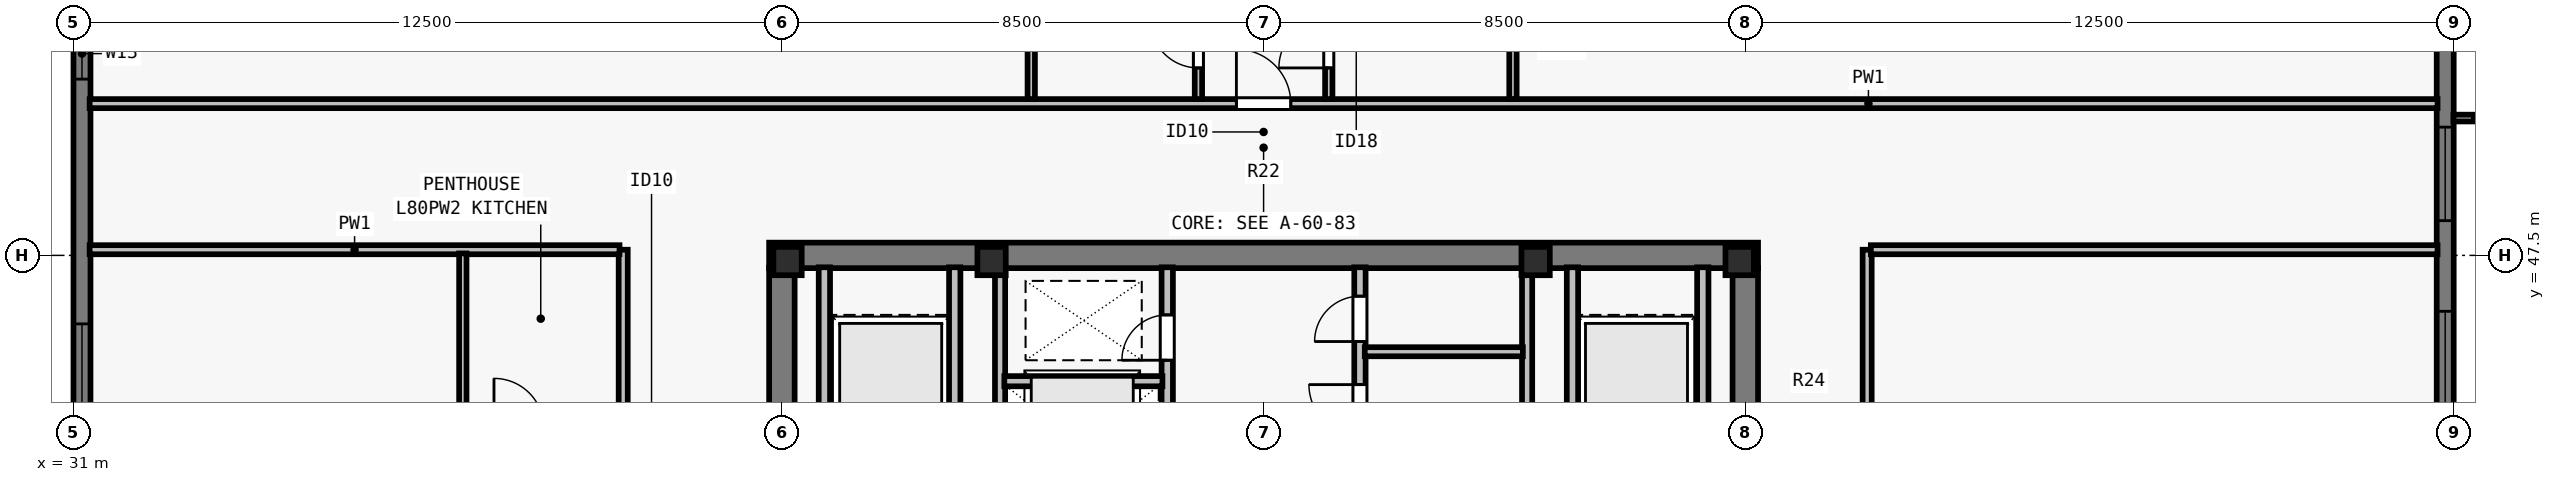
"""IFC4 building model, lengths in metres.
Left out: names, types, materials, properties, quantities, classifications, styles, units other than length and angle.
Written with IfcOpenShell. Run it as: python <this file> out.ifc"""

import sys

from ifc_helpers import new_model, si_unit, direction, frame, frame_2d, origin, origin_2d, place, context, subcontext, project, spatial, rectangle, i_section, extrude, element, fill, save


model = new_model("IFC4")
c1 = context("Model", 3, precision=1e-05, world=origin(), true_north=direction((0.0, 1.0)))
c2 = subcontext(c1, "Body", "Model", "MODEL_VIEW")
j1 = project(units=[si_unit("LENGTHUNIT", "METRE"), si_unit("PLANEANGLEUNIT", "RADIAN")], contexts=[c1])
p1 = place(None, origin())
s1 = spatial("IfcSite", under=j1, at=p1, CompositionType="ELEMENT")
p2 = place(p1, origin())
s2 = spatial("IfcBuilding", under=s1, at=p2, CompositionType="ELEMENT")
p3 = place(p2, frame((0.0, 0.0, 291.0)))
s3 = spatial("IfcBuildingStorey", under=s2, at=p3, CompositionType="ELEMENT", Elevation=291.0)
for number, where, z_axis, x_axis in (
    (1, (43.6, 47.4, 0.0), (0.0, 0.0, 1.0), (1.0, 0.0, 0.0)),
    (2, (47.2, 47.4, 0.0), (0.0, 0.0, 1.0), (1.0, 0.0, 0.0)),
    (3, (56.8, 47.4, 0.0), (0.0, 0.0, 1.0), (1.0, 0.0, 0.0)),
    (4, (60.4, 47.4, 0.0), (0.0, 0.0, 1.0), (1.0, 0.0, 0.0)),
):
    element("IfcColumn", number, at=place(p3, frame(where, z_axis=z_axis, x_axis=x_axis)), inside=s3, PredefinedType="COLUMN", context=c2, shape_type="SweptSolid", body=[
        extrude(i_section(OverallWidth=0.5, OverallDepth=0.5, WebThickness=0.028, FlangeThickness=0.045, at=origin_2d()), origin(), (0.0, 0.0, 1.0), 3.5),
    ])
p4 = place(p3, frame((31.15, 23.5, 0.0), z_axis=(0.0, 0.0, 1.0), x_axis=(0.0, 1.0, 0.0)))
e5 = element("IfcWall", 5, at=p4, inside=s3, PredefinedType="SOLIDWALL", context=c2, shape_type="SweptSolid", body=[
    extrude(rectangle(XDim=30.722, YDim=0.3, at=frame_2d((15.361, 0.0))), origin(), (0.0, 0.0, 1.0), 3.29),
])
p5 = place(p4, frame((4.944, 0.0, 0.8)))
e6 = element("IfcOpeningElement", 6, at=p5, cuts=e5, PredefinedType="OPENING", context=c2, shape_type="SweptSolid", body=[
    extrude(rectangle(XDim=1.65, YDim=1.758, at=frame_2d((0.825, 0.879))), frame((0.0, 0.16, 0.0), z_axis=(0.0, -1.0, 0.0), x_axis=(1.0, 0.0, 0.0)), (0.0, 0.0, 1.0), 0.32),
])
p6 = place(p4, frame((7.355, 0.0, 0.8)))
e7 = element("IfcOpeningElement", 7, at=p6, cuts=e5, PredefinedType="OPENING", context=c2, shape_type="SweptSolid", body=[
    extrude(rectangle(XDim=2.0, YDim=1.758, at=frame_2d((1.0, 0.879))), frame((0.0, 0.16, 0.0), z_axis=(0.0, -1.0, 0.0), x_axis=(1.0, 0.0, 0.0)), (0.0, 0.0, 1.0), 0.32),
])
p7 = place(p4, frame((12.617, 0.0, 0.8)))
e8 = element("IfcOpeningElement", 8, at=p7, cuts=e5, PredefinedType="OPENING", context=c2, shape_type="SweptSolid", body=[
    extrude(rectangle(XDim=1.65, YDim=1.758, at=frame_2d((0.825, 0.879))), frame((0.0, 0.16, 0.0), z_axis=(0.0, -1.0, 0.0), x_axis=(1.0, 0.0, 0.0)), (0.0, 0.0, 1.0), 0.32),
])
p8 = place(p4, frame((16.28, 0.0, 0.8)))
e9 = element("IfcOpeningElement", 9, at=p8, cuts=e5, PredefinedType="OPENING", context=c2, shape_type="SweptSolid", body=[
    extrude(rectangle(XDim=2.0, YDim=1.758, at=frame_2d((1.0, 0.879))), frame((0.0, 0.16, 0.0), z_axis=(0.0, -1.0, 0.0), x_axis=(1.0, 0.0, 0.0)), (0.0, 0.0, 1.0), 0.32),
])
p9 = place(p4, frame((21.142, 0.0, 0.8)))
e10 = element("IfcOpeningElement", 10, at=p9, cuts=e5, PredefinedType="OPENING", context=c2, shape_type="SweptSolid", body=[
    extrude(rectangle(XDim=1.65, YDim=1.758, at=frame_2d((0.825, 0.879))), frame((0.0, 0.16, 0.0), z_axis=(0.0, -1.0, 0.0), x_axis=(1.0, 0.0, 0.0)), (0.0, 0.0, 1.0), 0.32),
])
p10 = place(p4, frame((27.11, 0.0, 0.8)))
e11 = element("IfcOpeningElement", 11, at=p10, cuts=e5, PredefinedType="OPENING", context=c2, shape_type="SweptSolid", body=[
    extrude(rectangle(XDim=0.9, YDim=1.75, at=frame_2d((0.45, 0.875))), frame((0.0, 0.16, 0.0), z_axis=(0.0, -1.0, 0.0), x_axis=(1.0, 0.0, 0.0)), (0.0, 0.0, 1.0), 0.32),
])
p11 = place(p3, frame((72.85, 54.5, 0.0), z_axis=(0.0, 0.0, 1.0), x_axis=(0.0, -1.0, 0.0)))
e12 = element("IfcWall", 12, at=p11, inside=s3, PredefinedType="SOLIDWALL", context=c2, shape_type="SweptSolid", body=[
    extrude(rectangle(XDim=22.222, YDim=0.3, at=frame_2d((11.111, 0.0))), origin(), (0.0, 0.0, 1.0), 3.29),
])
p12 = place(p11, frame((4.737, 0.0, 0.8)))
e13 = element("IfcOpeningElement", 13, at=p12, cuts=e12, PredefinedType="OPENING", context=c2, shape_type="SweptSolid", body=[
    extrude(rectangle(XDim=1.65, YDim=1.758, at=frame_2d((0.825, 0.879))), frame((0.0, 0.16, 0.0), z_axis=(0.0, -1.0, 0.0), x_axis=(1.0, 0.0, 0.0)), (0.0, 0.0, 1.0), 0.32),
])
p13 = place(p11, frame((7.987, 0.0, 0.8)))
e14 = element("IfcOpeningElement", 14, at=p13, cuts=e12, PredefinedType="OPENING", context=c2, shape_type="SweptSolid", body=[
    extrude(rectangle(XDim=2.0, YDim=1.758, at=frame_2d((1.0, 0.879))), frame((0.0, 0.16, 0.0), z_axis=(0.0, -1.0, 0.0), x_axis=(1.0, 0.0, 0.0)), (0.0, 0.0, 1.0), 0.32),
])
p14 = place(p11, frame((11.586, 0.0, 0.8)))
e15 = element("IfcOpeningElement", 15, at=p14, cuts=e12, PredefinedType="OPENING", context=c2, shape_type="SweptSolid", body=[
    extrude(rectangle(XDim=1.65, YDim=1.758, at=frame_2d((0.825, 0.879))), frame((0.0, 0.16, 0.0), z_axis=(0.0, -1.0, 0.0), x_axis=(1.0, 0.0, 0.0)), (0.0, 0.0, 1.0), 0.32),
])
p15 = place(p11, frame((14.835, 0.0, 0.8)))
e16 = element("IfcOpeningElement", 16, at=p15, cuts=e12, PredefinedType="OPENING", context=c2, shape_type="SweptSolid", body=[
    extrude(rectangle(XDim=2.0, YDim=1.758, at=frame_2d((1.0, 0.879))), frame((0.0, 0.16, 0.0), z_axis=(0.0, -1.0, 0.0), x_axis=(1.0, 0.0, 0.0)), (0.0, 0.0, 1.0), 0.32),
])
p16 = place(p11, frame((17.985, 0.0, 0.8)))
e17 = element("IfcOpeningElement", 17, at=p16, cuts=e12, PredefinedType="OPENING", context=c2, shape_type="SweptSolid", body=[
    extrude(rectangle(XDim=1.65, YDim=1.758, at=frame_2d((0.825, 0.879))), frame((0.0, 0.16, 0.0), z_axis=(0.0, -1.0, 0.0), x_axis=(1.0, 0.0, 0.0)), (0.0, 0.0, 1.0), 0.32),
])
p17 = place(p3, frame((43.275, 47.5, 0.0), z_axis=(0.0, 0.0, 1.0), x_axis=(1.0, 0.0, 0.0)))
e18 = element("IfcWall", 18, at=p17, inside=s3, PredefinedType="SHEAR", context=c2, shape_type="SweptSolid", body=[
    extrude(rectangle(XDim=17.45, YDim=0.45, at=frame_2d((8.725, 0.0))), origin(), (0.0, 0.0, 1.0), 3.29),
])
for number, where, z_axis, x_axis in (
    (19, (43.5, 40.8, 0.0), (0.0, 0.0, 1.0), (0.0, 1.0, 0.0)),
    (20, (60.5, 40.8, 0.0), (0.0, 0.0, 1.0), (0.0, 1.0, 0.0)),
):
    element("IfcWall", number, at=place(p3, frame(where, z_axis=z_axis, x_axis=x_axis)), inside=s3, PredefinedType="SHEAR", context=c2, shape_type="SweptSolid", body=[
        extrude(rectangle(XDim=6.485, YDim=0.45, at=frame_2d((3.242, 0.0))), origin(), (0.0, 0.0, 1.0), 3.29),
    ])
p18 = place(p3, frame((50.3, 40.585, 0.0), z_axis=(0.0, 0.0, 1.0), x_axis=(0.0, 1.0, 0.0)))
e21 = element("IfcWall", 21, at=p18, inside=s3, PredefinedType="SOLIDWALL", context=c2, shape_type="SweptSolid", body=[
    extrude(rectangle(XDim=6.705, YDim=0.2, at=frame_2d((3.353, 0.0))), origin(), (0.0, 0.0, 1.0), 3.29),
])
p19 = place(p18, frame((0.515, 0.0, 0.0)))
e22 = element("IfcOpeningElement", 22, at=p19, cuts=e21, PredefinedType="OPENING", context=c2, shape_type="SweptSolid", body=[
    extrude(rectangle(XDim=1.1, YDim=2.2, at=frame_2d((0.55, 1.1))), frame((0.0, 0.11, 0.0), z_axis=(0.0, -1.0, 0.0), x_axis=(1.0, 0.0, 0.0)), (0.0, 0.0, 1.0), 0.22),
])
p20 = place(p18, frame((3.015, 0.0, 0.0)))
e23 = element("IfcOpeningElement", 23, at=p20, cuts=e21, PredefinedType="OPENING", context=c2, shape_type="SweptSolid", body=[
    extrude(rectangle(XDim=1.1, YDim=2.2, at=frame_2d((0.55, 1.1))), frame((0.0, 0.11, 0.0), z_axis=(0.0, -1.0, 0.0), x_axis=(1.0, 0.0, 0.0)), (0.0, 0.0, 1.0), 0.22),
])
p21 = place(p18, frame((5.065, 0.0, 0.0)))
e24 = element("IfcOpeningElement", 24, at=p21, cuts=e21, PredefinedType="OPENING", context=c2, shape_type="SweptSolid", body=[
    extrude(rectangle(XDim=0.8, YDim=2.08, at=frame_2d((0.4, 1.04))), frame((0.0, 0.11, 0.0), z_axis=(0.0, -1.0, 0.0), x_axis=(1.0, 0.0, 0.0)), (0.0, 0.0, 1.0), 0.22),
])
p22 = place(p3, frame((53.7, 40.585, 0.0), z_axis=(0.0, 0.0, 1.0), x_axis=(0.0, 1.0, 0.0)))
e25 = element("IfcWall", 25, at=p22, inside=s3, PredefinedType="SOLIDWALL", context=c2, shape_type="SweptSolid", body=[
    extrude(rectangle(XDim=6.705, YDim=0.2, at=frame_2d((3.353, 0.0))), origin(), (0.0, 0.0, 1.0), 3.29),
])
p23 = place(p22, frame((0.195, 0.0, 0.0)))
e26 = element("IfcOpeningElement", 26, at=p23, cuts=e25, PredefinedType="OPENING", context=c2, shape_type="SweptSolid", body=[
    extrude(rectangle(XDim=0.8, YDim=2.08, at=frame_2d((0.4, 1.04))), frame((0.0, 0.11, 0.0), z_axis=(0.0, -1.0, 0.0), x_axis=(1.0, 0.0, 0.0)), (0.0, 0.0, 1.0), 0.22),
])
p24 = place(p22, frame((1.865, 0.0, 0.0)))
e27 = element("IfcOpeningElement", 27, at=p24, cuts=e25, PredefinedType="OPENING", context=c2, shape_type="SweptSolid", body=[
    extrude(rectangle(XDim=1.1, YDim=2.2, at=frame_2d((0.55, 1.1))), frame((0.0, 0.11, 0.0), z_axis=(0.0, -1.0, 0.0), x_axis=(1.0, 0.0, 0.0)), (0.0, 0.0, 1.0), 0.22),
])
p25 = place(p22, frame((3.735, 0.0, 0.0)))
e28 = element("IfcOpeningElement", 28, at=p25, cuts=e25, PredefinedType="OPENING", context=c2, shape_type="SweptSolid", body=[
    extrude(rectangle(XDim=0.9, YDim=2.12, at=frame_2d((0.45, 1.06))), frame((0.0, 0.11, 0.0), z_axis=(0.0, -1.0, 0.0), x_axis=(1.0, 0.0, 0.0)), (0.0, 0.0, 1.0), 0.22),
])
p26 = place(p22, frame((5.395, 0.0, 0.0)))
e29 = element("IfcOpeningElement", 29, at=p26, cuts=e25, PredefinedType="OPENING", context=c2, shape_type="SweptSolid", body=[
    extrude(rectangle(XDim=0.8, YDim=2.1, at=frame_2d((0.4, 1.05))), frame((0.0, 0.11, 0.0), z_axis=(0.0, -1.0, 0.0), x_axis=(1.0, 0.0, 0.0)), (0.0, 0.0, 1.0), 0.22),
])
for number, where, z_axis, x_axis in (
    (30, (46.55, 43.735, 0.0), (0.0, 0.0, 1.0), (0.0, 1.0, 0.0)),
    (31, (44.25, 43.735, 0.0), (0.0, 0.0, 1.0), (0.0, 1.0, 0.0)),
    (32, (57.45, 43.735, 0.0), (0.0, 0.0, 1.0), (0.0, 1.0, 0.0)),
    (33, (59.75, 43.735, 0.0), (0.0, 0.0, 1.0), (0.0, 1.0, 0.0)),
):
    element("IfcWall", number, at=place(p3, frame(where, z_axis=z_axis, x_axis=x_axis)), inside=s3, PredefinedType="SOLIDWALL", context=c2, shape_type="SweptSolid", body=[
        extrude(rectangle(XDim=3.555, YDim=0.2, at=frame_2d((1.777, 0.0))), origin(), (0.0, 0.0, 1.0), 3.29),
    ])
p27 = place(p3, frame((47.35, 43.735, 0.0), z_axis=(0.0, 0.0, 1.0), x_axis=(0.0, 1.0, 0.0)))
e34 = element("IfcWall", 34, at=p27, inside=s3, PredefinedType="SOLIDWALL", context=c2, shape_type="SweptSolid", body=[
    extrude(rectangle(XDim=3.555, YDim=0.18, at=frame_2d((1.777, 0.0))), origin(), (0.0, 0.0, 1.0), 3.29),
])
p28 = place(p3, frame((47.425, 45.28, 0.0), z_axis=(0.0, 0.0, 1.0), x_axis=(1.0, 0.0, 0.0)))
e35 = element("IfcWall", 35, at=p28, inside=s3, PredefinedType="SOLIDWALL", context=c2, shape_type="SweptSolid", body=[
    extrude(rectangle(XDim=2.79, YDim=0.18, at=frame_2d((1.395, 0.0))), origin(), (0.0, 0.0, 1.0), 3.29),
])
p29 = place(p3, frame((56.65, 43.735, 0.0), z_axis=(0.0, 0.0, 1.0), x_axis=(0.0, 1.0, 0.0)))
e36 = element("IfcWall", 36, at=p29, inside=s3, PredefinedType="SOLIDWALL", context=c2, shape_type="SweptSolid", body=[
    extrude(rectangle(XDim=3.555, YDim=0.18, at=frame_2d((1.777, 0.0))), origin(), (0.0, 0.0, 1.0), 3.29),
])
p30 = place(p3, frame((53.785, 45.8, 0.0), z_axis=(0.0, 0.0, 1.0), x_axis=(1.0, 0.0, 0.0)))
e37 = element("IfcWall", 37, at=p30, inside=s3, PredefinedType="PARTITIONING", context=c2, shape_type="SweptSolid", body=[
    extrude(rectangle(XDim=2.79, YDim=0.16, at=frame_2d((1.395, 0.0))), origin(), (0.0, 0.0, 1.0), 3.29),
])
p31 = place(p3, frame((31.285, 50.177, 0.0), z_axis=(0.0, 0.0, 1.0), x_axis=(1.0, 0.0, 0.0)))
e38 = element("IfcWall", 38, at=p31, inside=s3, PredefinedType="PARTITIONING", context=c2, shape_type="SweptSolid", body=[
    extrude(rectangle(XDim=41.43, YDim=0.16, at=frame_2d((20.715, 0.0))), origin(), (0.0, 0.0, 1.0), 3.009),
])
p32 = place(p31, frame((20.235, 0.0, 0.0)))
e39 = element("IfcOpeningElement", 39, at=p32, cuts=e38, PredefinedType="OPENING", context=c2, shape_type="SweptSolid", body=[
    extrude(rectangle(XDim=0.96, YDim=2.18, at=frame_2d((0.48, 1.09))), frame((0.0, 0.09, 0.0), z_axis=(0.0, -1.0, 0.0), x_axis=(1.0, 0.0, 0.0)), (0.0, 0.0, 1.0), 0.18),
])
p33 = place(p3, frame((40.7, 30.4, 0.0), z_axis=(0.0, 0.0, 1.0), x_axis=(0.0, 1.0, 0.0)))
e40 = element("IfcWall", 40, at=p33, inside=s3, PredefinedType="PARTITIONING", context=c2, shape_type="SweptSolid", body=[
    extrude(rectangle(XDim=17.2, YDim=0.16, at=frame_2d((8.6, 0.0))), origin(), (0.0, 0.0, 1.0), 3.009),
])
p34 = place(p33, frame((3.82, 0.0, 0.0)))
e41 = element("IfcOpeningElement", 41, at=p34, cuts=e40, PredefinedType="OPENING", context=c2, shape_type="SweptSolid", body=[
    extrude(rectangle(XDim=0.96, YDim=2.18, at=frame_2d((0.48, 1.09))), frame((0.0, 0.09, 0.0), z_axis=(0.0, -1.0, 0.0), x_axis=(1.0, 0.0, 0.0)), (0.0, 0.0, 1.0), 0.18),
])
p35 = place(p33, frame((12.42, 0.0, 0.0)))
e42 = element("IfcOpeningElement", 42, at=p35, cuts=e40, PredefinedType="OPENING", context=c2, shape_type="SweptSolid", body=[
    extrude(rectangle(XDim=0.96, YDim=2.18, at=frame_2d((0.48, 1.09))), frame((0.0, 0.09, 0.0), z_axis=(0.0, -1.0, 0.0), x_axis=(1.0, 0.0, 0.0)), (0.0, 0.0, 1.0), 0.18),
])
p36 = place(p3, frame((62.65, 30.4, 0.0), z_axis=(0.0, 0.0, 1.0), x_axis=(0.0, 1.0, 0.0)))
e43 = element("IfcWall", 43, at=p36, inside=s3, PredefinedType="PARTITIONING", context=c2, shape_type="SweptSolid", body=[
    extrude(rectangle(XDim=17.2, YDim=0.16, at=frame_2d((8.6, 0.0))), origin(), (0.0, 0.0, 1.0), 3.29),
])
p37 = place(p36, frame((8.0, 0.0, 0.0)))
e44 = element("IfcOpeningElement", 44, at=p37, cuts=e43, PredefinedType="OPENING", context=c2, shape_type="SweptSolid", body=[
    extrude(rectangle(XDim=0.96, YDim=2.12, at=frame_2d((0.48, 1.06))), frame((0.0, 0.09, 0.0), z_axis=(0.0, -1.0, 0.0), x_axis=(1.0, 0.0, 0.0)), (0.0, 0.0, 1.0), 0.18),
])
p38 = place(p3, frame((31.285, 47.6, 0.0), z_axis=(0.0, 0.0, 1.0), x_axis=(1.0, 0.0, 0.0)))
e45 = element("IfcWall", 45, at=p38, inside=s3, PredefinedType="PARTITIONING", context=c2, shape_type="SweptSolid", body=[
    extrude(rectangle(XDim=9.35, YDim=0.16, at=frame_2d((4.675, 0.0))), origin(), (0.0, 0.0, 1.0), 3.29),
])
p39 = place(p3, frame((62.715, 47.6, 0.0), z_axis=(0.0, 0.0, 1.0), x_axis=(1.0, 0.0, 0.0)))
e46 = element("IfcWall", 46, at=p39, inside=s3, PredefinedType="PARTITIONING", context=c2, shape_type="SweptSolid", body=[
    extrude(rectangle(XDim=10.0, YDim=0.16, at=frame_2d((5.0, 0.0))), origin(), (0.0, 0.0, 1.0), 3.29),
])
p40 = place(p3, frame((47.9, 50.258, 0.0), z_axis=(0.0, 0.0, 1.0), x_axis=(0.0, 1.0, 0.0)))
e47 = element("IfcWall", 47, at=p40, inside=s3, PredefinedType="PLUMBINGWALL", context=c2, shape_type="SweptSolid", body=[
    extrude(rectangle(XDim=2.75, YDim=0.13, at=frame_2d((1.375, 0.0))), origin(), (0.0, 0.0, 1.0), 3.29),
])
p41 = place(p3, frame((50.85, 50.258, 0.0), z_axis=(0.0, 0.0, 1.0), x_axis=(0.0, 1.0, 0.0)))
e48 = element("IfcWall", 48, at=p41, inside=s3, PredefinedType="PLUMBINGWALL", context=c2, shape_type="SweptSolid", body=[
    extrude(rectangle(XDim=2.75, YDim=0.13, at=frame_2d((1.375, 0.0))), origin(), (0.0, 0.0, 1.0), 3.009),
])
p42 = place(p41, frame((0.55, 0.0, 0.0)))
e49 = element("IfcOpeningElement", 49, at=p42, cuts=e48, PredefinedType="OPENING", context=c2, shape_type="SweptSolid", body=[
    extrude(rectangle(XDim=0.85, YDim=2.08, at=frame_2d((0.425, 1.04))), frame((0.0, 0.075, 0.0), z_axis=(0.0, -1.0, 0.0), x_axis=(1.0, 0.0, 0.0)), (0.0, 0.0, 1.0), 0.15),
])
p43 = place(p3, frame((56.4, 50.258, 0.0), z_axis=(0.0, 0.0, 1.0), x_axis=(0.0, 1.0, 0.0)))
e50 = element("IfcWall", 50, at=p43, inside=s3, PredefinedType="PLUMBINGWALL", context=c2, shape_type="SweptSolid", body=[
    extrude(rectangle(XDim=2.75, YDim=0.13, at=frame_2d((1.375, 0.0))), origin(), (0.0, 0.0, 1.0), 3.29),
])
p44 = place(p3, frame((53.15, 50.258, 0.0), z_axis=(0.0, 0.0, 1.0), x_axis=(0.0, 1.0, 0.0)))
e51 = element("IfcWall", 51, at=p44, inside=s3, PredefinedType="PLUMBINGWALL", context=c2, shape_type="SweptSolid", body=[
    extrude(rectangle(XDim=2.75, YDim=0.13, at=frame_2d((1.375, 0.0))), origin(), (0.0, 0.0, 1.0), 3.29),
])
p45 = place(p44, frame((0.55, 0.0, 0.0)))
e52 = element("IfcOpeningElement", 52, at=p45, cuts=e51, PredefinedType="OPENING", context=c2, shape_type="SweptSolid", body=[
    extrude(rectangle(XDim=0.88, YDim=2.1, at=frame_2d((0.44, 1.05))), frame((0.0, 0.075, 0.0), z_axis=(0.0, -1.0, 0.0), x_axis=(1.0, 0.0, 0.0)), (0.0, 0.0, 1.0), 0.15),
])
p46 = place(p3, frame((37.87, 44.5, 0.0), z_axis=(0.0, 0.0, 1.0), x_axis=(0.0, 1.0, 0.0)))
e53 = element("IfcWall", 53, at=p46, inside=s3, PredefinedType="PLUMBINGWALL", context=c2, shape_type="SweptSolid", body=[
    extrude(rectangle(XDim=3.035, YDim=0.13, at=frame_2d((1.518, 0.0))), origin(), (0.0, 0.0, 1.0), 3.29),
])
p47 = place(p9, origin())
e54 = element("IfcWindow", 54, at=p47, inside=s3, PartitioningType="SINGLE_PANEL", PredefinedType="WINDOW", context=c2, shape_type="SweptSolid", body=[
    extrude(rectangle(XDim=1.65, YDim=1.758, at=frame_2d((0.825, 0.879))), frame((0.0, -0.05, 0.0), z_axis=(0.0, -1.0, 0.0), x_axis=(1.0, 0.0, 0.0)), (0.0, 0.0, 1.0), 0.06),
])
fill(e10, e54)
p48 = place(p12, origin())
e55 = element("IfcWindow", 55, at=p48, inside=s3, PartitioningType="SINGLE_PANEL", PredefinedType="WINDOW", context=c2, shape_type="SweptSolid", body=[
    extrude(rectangle(XDim=1.65, YDim=1.758, at=frame_2d((0.825, 0.879))), frame((0.0, -0.05, 0.0), z_axis=(0.0, -1.0, 0.0), x_axis=(1.0, 0.0, 0.0)), (0.0, 0.0, 1.0), 0.06),
])
fill(e13, e55)
p49 = place(p13, origin())
e56 = element("IfcWindow", 56, at=p49, inside=s3, PartitioningType="SINGLE_PANEL", PredefinedType="WINDOW", context=c2, shape_type="SweptSolid", body=[
    extrude(rectangle(XDim=2.0, YDim=1.758, at=frame_2d((1.0, 0.879))), frame((0.0, -0.05, 0.0), z_axis=(0.0, -1.0, 0.0), x_axis=(1.0, 0.0, 0.0)), (0.0, 0.0, 1.0), 0.06),
])
fill(e14, e56)
p50 = place(p10, origin())
e57 = element("IfcWindow", 57, at=p50, inside=s3, PartitioningType="SINGLE_PANEL", PredefinedType="WINDOW", context=c2, shape_type="SweptSolid", body=[
    extrude(rectangle(XDim=0.9, YDim=1.75, at=frame_2d((0.45, 0.875))), frame((0.0, -0.04, 0.0), z_axis=(0.0, -1.0, 0.0), x_axis=(1.0, 0.0, 0.0)), (0.0, 0.0, 1.0), 0.06),
])
fill(e11, e57)
p51 = place(p21, origin())
e58 = element("IfcDoor", 58, at=p51, inside=s3, OperationType="SINGLE_SWING_LEFT", PredefinedType="DOOR", context=c2, shape_type="SweptSolid", body=[
    extrude(rectangle(XDim=0.8, YDim=2.08, at=frame_2d((0.4, 1.04))), frame((0.0, 0.025, 0.0), z_axis=(0.0, -1.0, 0.0), x_axis=(1.0, 0.0, 0.0)), (0.0, 0.0, 1.0), 0.05),
])
fill(e24, e58)
p52 = place(p25, origin())
e59 = element("IfcDoor", 59, at=p52, inside=s3, OperationType="SINGLE_SWING_RIGHT", PredefinedType="DOOR", context=c2, shape_type="SweptSolid", body=[
    extrude(rectangle(XDim=0.9, YDim=2.12, at=frame_2d((0.45, 1.06))), frame((0.0, 0.025, 0.0), z_axis=(0.0, -1.0, 0.0), x_axis=(1.0, 0.0, 0.0)), (0.0, 0.0, 1.0), 0.05),
])
fill(e28, e59)
p53 = place(p26, origin())
e60 = element("IfcDoor", 60, at=p53, inside=s3, OperationType="SINGLE_SWING_LEFT", PredefinedType="DOOR", context=c2, shape_type="SweptSolid", body=[
    extrude(rectangle(XDim=0.8, YDim=2.1, at=frame_2d((0.4, 1.05))), frame((0.0, 0.025, 0.0), z_axis=(0.0, -1.0, 0.0), x_axis=(1.0, 0.0, 0.0)), (0.0, 0.0, 1.0), 0.05),
])
fill(e29, e60)
p54 = place(p42, origin())
e61 = element("IfcDoor", 61, at=p54, inside=s3, OperationType="SINGLE_SWING_RIGHT", PredefinedType="DOOR", context=c2, shape_type="SweptSolid", body=[
    extrude(rectangle(XDim=0.85, YDim=2.08, at=frame_2d((0.425, 1.04))), frame((0.0, 0.025, 0.0), z_axis=(0.0, -1.0, 0.0), x_axis=(1.0, 0.0, 0.0)), (0.0, 0.0, 1.0), 0.05),
])
fill(e49, e61)
p55 = place(p45, origin())
e62 = element("IfcDoor", 62, at=p55, inside=s3, OperationType="SINGLE_SWING_LEFT", PredefinedType="DOOR", context=c2, shape_type="SweptSolid", body=[
    extrude(rectangle(XDim=0.88, YDim=2.1, at=frame_2d((0.44, 1.05))), frame((0.0, 0.025, 0.0), z_axis=(0.0, -1.0, 0.0), x_axis=(1.0, 0.0, 0.0)), (0.0, 0.0, 1.0), 0.05),
])
fill(e52, e62)
p56 = place(p32, origin())
e63 = element("IfcDoor", 63, at=p56, inside=s3, OperationType="SINGLE_SWING_LEFT", PredefinedType="DOOR", context=c2, shape_type="SweptSolid", body=[
    extrude(rectangle(XDim=0.96, YDim=2.18, at=frame_2d((0.48, 1.09))), frame((0.0, 0.025, 0.0), z_axis=(0.0, -1.0, 0.0), x_axis=(1.0, 0.0, 0.0)), (0.0, 0.0, 1.0), 0.05),
])
fill(e39, e63)
save(model, sys.argv[1])
